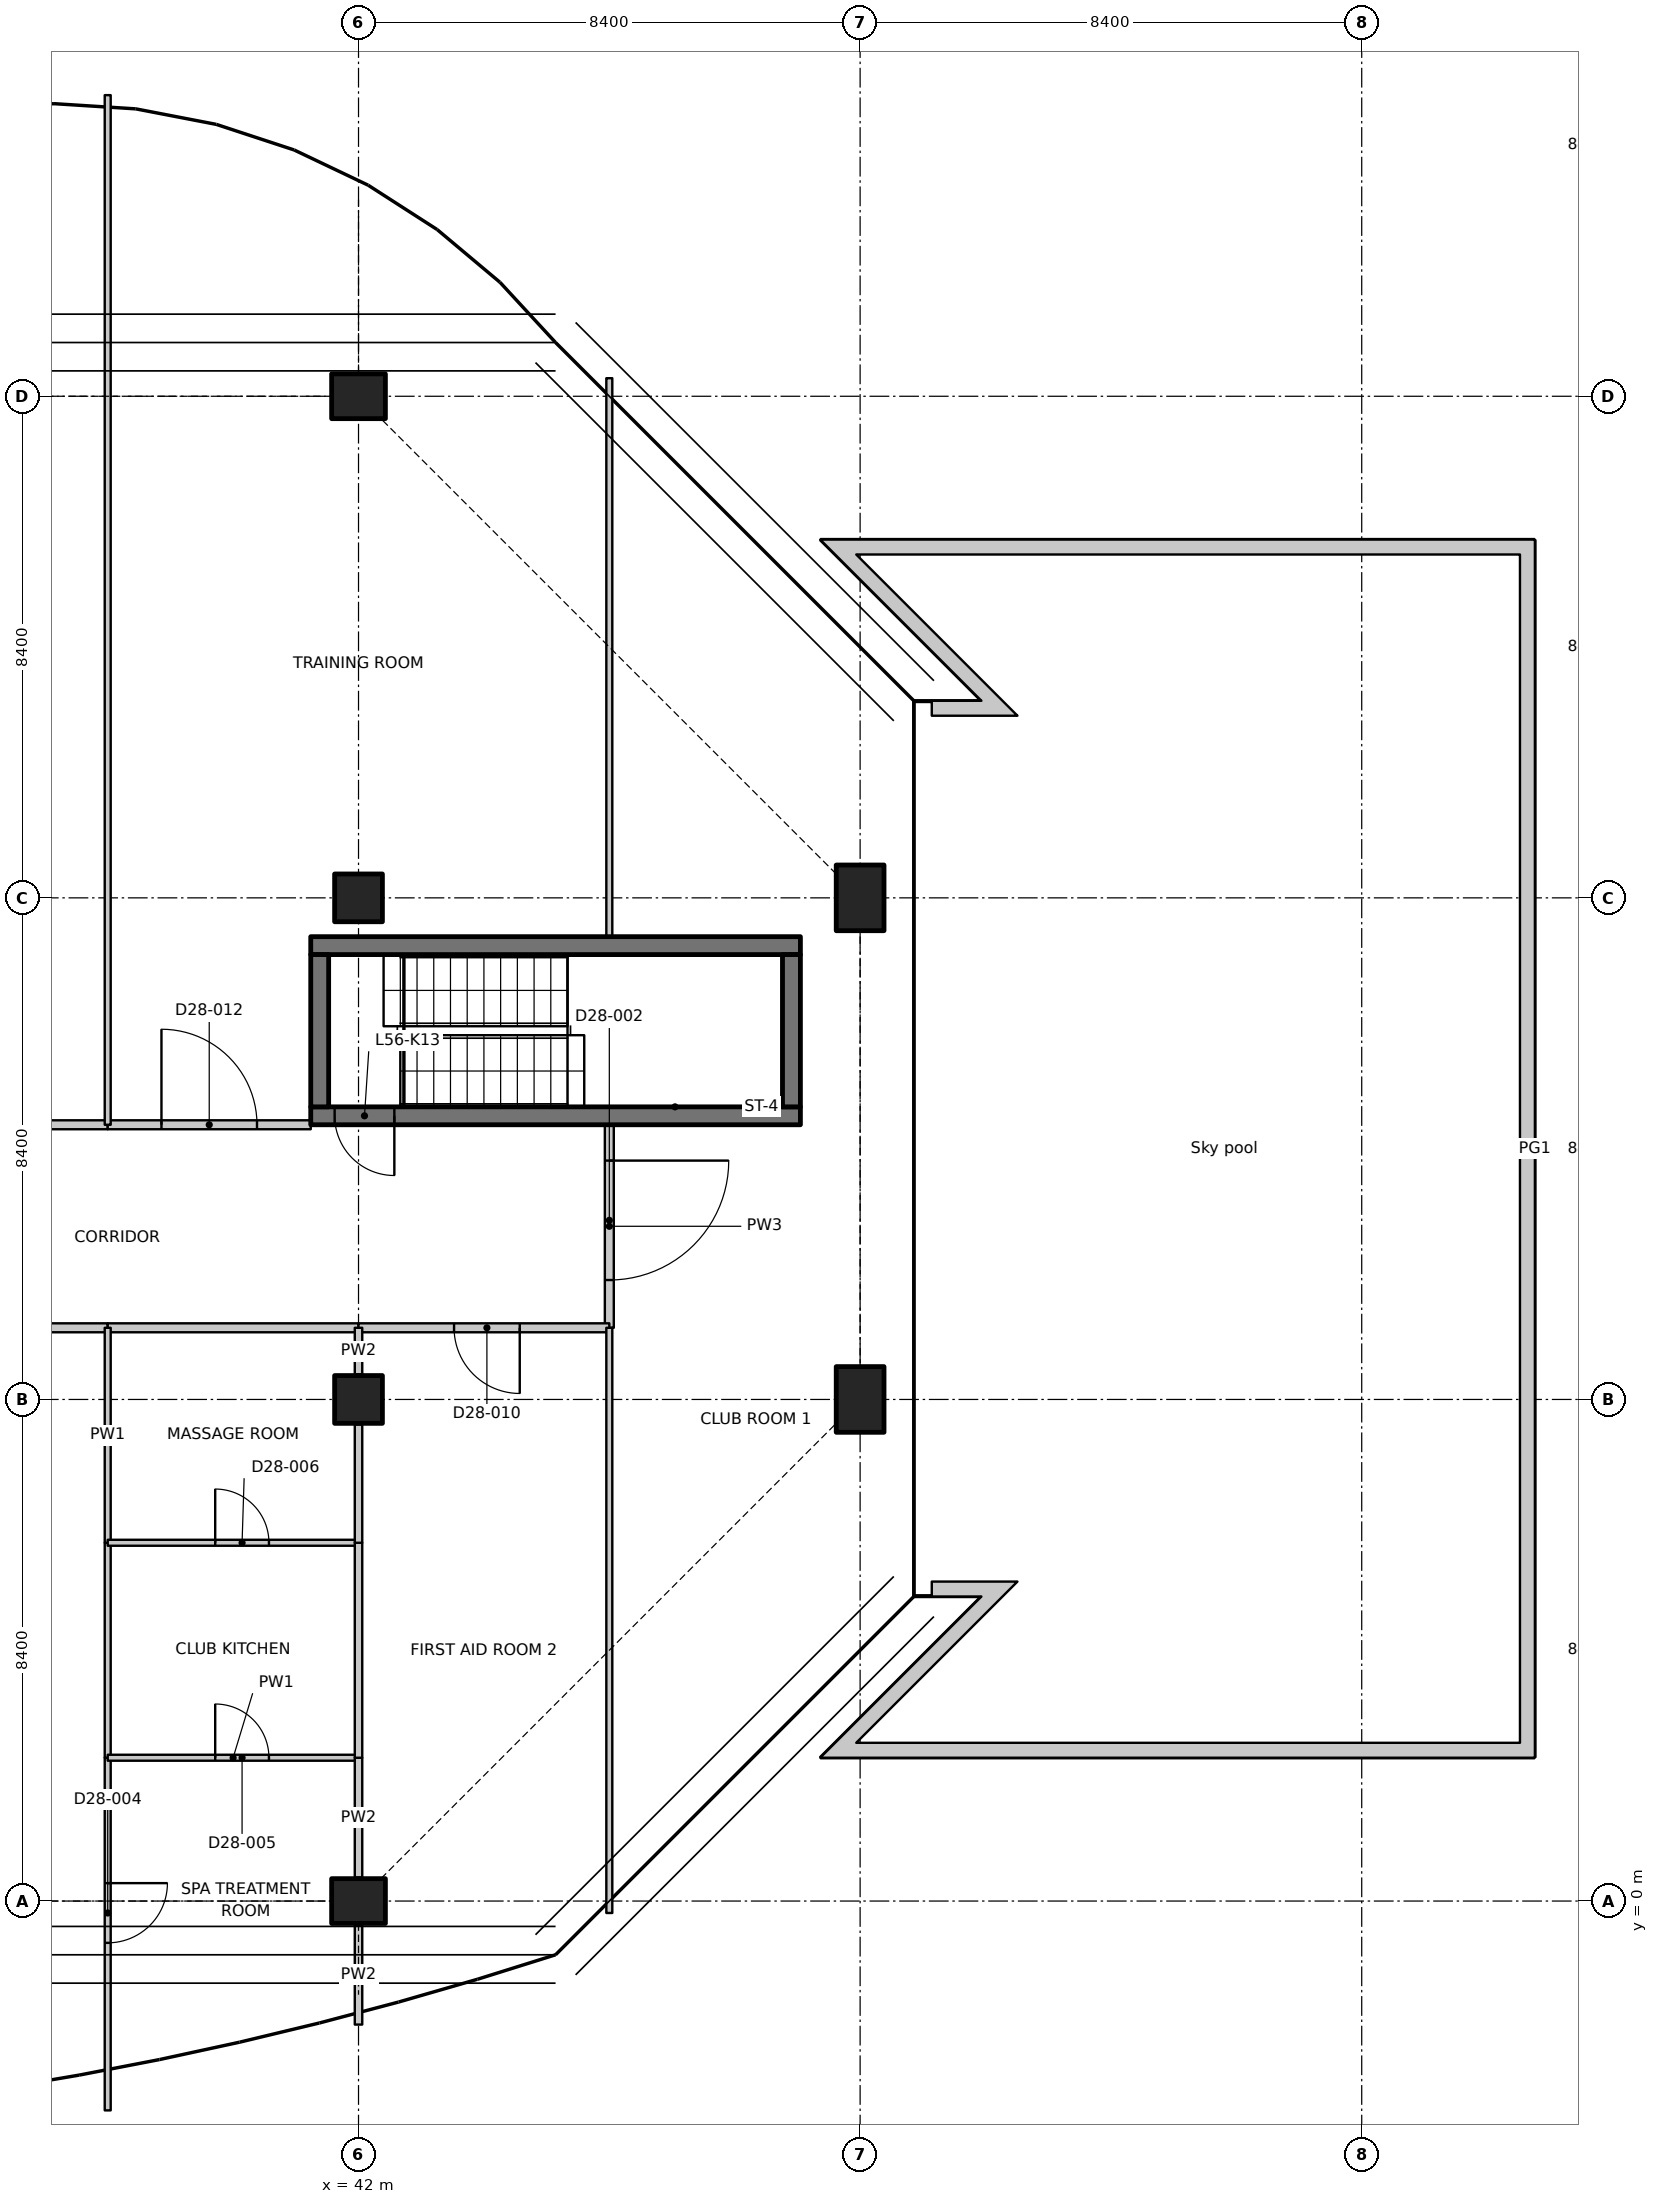
"""IFC4 building model, lengths in metres.
Left out: names, types, materials, properties, quantities, classifications, styles, units other than length and angle.
Written with IfcOpenShell. Run it as: python <this file> out.ifc"""

import sys

from ifc_helpers import new_model, si_unit, direction, frame, frame_2d, origin, origin_2d, place, context, subcontext, project, spatial, polyline, rectangle, outline, extrude, element, fill, save


model = new_model("IFC4")
c1 = context("Model", 3, precision=1e-05, world=origin(), true_north=direction((0.0, 1.0)))
c2 = subcontext(c1, "Body", "Model", "MODEL_VIEW")
j1 = project(units=[si_unit("LENGTHUNIT", "METRE"), si_unit("PLANEANGLEUNIT", "RADIAN")], contexts=[c1])
p1 = place(None, origin())
s1 = spatial("IfcSite", under=j1, at=p1, CompositionType="ELEMENT")
p2 = place(p1, origin())
s2 = spatial("IfcBuilding", under=s1, at=p2, CompositionType="ELEMENT")
p3 = place(p2, frame((0.0, 0.0, 222.9)))
s3 = spatial("IfcBuildingStorey", under=s2, at=p3, CompositionType="ELEMENT", Elevation=222.9)
p4 = place(p3, frame((42.0, 0.0, 0.0), z_axis=(0.0, 0.0, 1.0), x_axis=(0.0, 1.0, 0.0)))
e1 = element("IfcColumn", 1, at=p4, inside=s3, PredefinedType="COLUMN", context=c2, shape_type="SweptSolid", body=[
    extrude(rectangle(XDim=0.75, YDim=0.9, at=origin_2d()), origin(), (0.0, 0.0, 1.0), 3.35),
])
for number, where, z_axis, x_axis in (
    (2, (42.0, 8.4, 0.0), (0.0, 0.0, 1.0), (1.0, 0.0, 0.0)),
    (3, (42.0, 16.8, 0.0), (0.0, 0.0, 1.0), (1.0, 0.0, 0.0)),
):
    element("IfcColumn", number, at=place(p3, frame(where, z_axis=z_axis, x_axis=x_axis)), inside=s3, PredefinedType="COLUMN", context=c2, shape_type="SweptSolid", body=[
        extrude(rectangle(XDim=0.8, YDim=0.8, at=origin_2d()), origin(), (0.0, 0.0, 1.0), 3.35),
    ])
p5 = place(p3, frame((42.0, 25.2, 0.0), z_axis=(0.0, 0.0, 1.0), x_axis=(0.0, 1.0, 0.0)))
e4 = element("IfcColumn", 4, at=p5, inside=s3, PredefinedType="COLUMN", context=c2, shape_type="SweptSolid", body=[
    extrude(rectangle(XDim=0.75, YDim=0.9, at=origin_2d()), origin(), (0.0, 0.0, 1.0), 3.35),
])
for number, where, z_axis, x_axis in (
    (5, (50.4, 8.4, 0.0), (0.0, 0.0, 1.0), (1.0, 0.0, 0.0)),
    (6, (50.4, 16.8, 0.0), (0.0, 0.0, 1.0), (1.0, 0.0, 0.0)),
):
    element("IfcColumn", number, at=place(p3, frame(where, z_axis=z_axis, x_axis=x_axis)), inside=s3, PredefinedType="COLUMN", context=c2, shape_type="SweptSolid", body=[
        extrude(rectangle(XDim=0.8, YDim=1.1, at=origin_2d()), origin(), (0.0, 0.0, 1.0), 3.35),
    ])
p6 = place(p3, origin())
e7 = element("IfcWall", 7, at=p6, inside=s3, PredefinedType="PARAPET", context=c2, shape_type="SweptSolid", body=[
    extrude(outline(polyline([(52.431, 5.1), (49.731, 2.4), (61.7, 2.4), (61.7, 22.8), (49.731, 22.8), (52.431, 20.1), (51.3, 20.1), (51.3, 20.08), (51.6, 20.08), (51.6, 19.85), (53.035, 19.85), (50.335, 22.55), (61.45, 22.55), (61.45, 2.65), (50.335, 2.65), (53.035, 5.35), (51.6, 5.35), (51.6, 5.12), (51.3, 5.12), (51.3, 5.1), (52.431, 5.1)])), origin(), (0.0, 0.0, 1.0), 3.0),
])
p7 = place(p3, frame((49.4, 13.15, 0.0), z_axis=(0.0, 0.0, 1.0), x_axis=(-1.0, 0.0, 0.0)))
e8 = element("IfcWall", 8, at=p7, inside=s3, PredefinedType="SHEAR", context=c2, shape_type="SweptSolid", body=[
    extrude(rectangle(XDim=8.2, YDim=0.3, at=frame_2d((4.1, 0.0))), origin(), (0.0, 0.0, 1.0), 3.35),
])
p8 = place(p7, frame((6.8, 0.0, 0.0)))
e9 = element("IfcOpeningElement", 9, at=p8, cuts=e8, PredefinedType="OPENING", context=c2, shape_type="SweptSolid", body=[
    extrude(rectangle(XDim=1.0, YDim=2.1, at=frame_2d((0.5, 1.05))), frame((0.0, 0.16, 0.0), z_axis=(0.0, -1.0, 0.0), x_axis=(1.0, 0.0, 0.0)), (0.0, 0.0, 1.0), 0.32),
])
p9 = place(p3, frame((41.2, 16.0, 0.0), z_axis=(0.0, 0.0, 1.0), x_axis=(1.0, 0.0, 0.0)))
e10 = element("IfcWall", 10, at=p9, inside=s3, PredefinedType="SHEAR", context=c2, shape_type="SweptSolid", body=[
    extrude(rectangle(XDim=8.2, YDim=0.3, at=frame_2d((4.1, 0.0))), origin(), (0.0, 0.0, 1.0), 3.35),
])
for number, where, z_axis, x_axis in (
    (11, (41.35, 13.3, 0.0), (0.0, 0.0, 1.0), (0.0, 1.0, 0.0)),
    (12, (49.25, 13.3, 0.0), (0.0, 0.0, 1.0), (0.0, 1.0, 0.0)),
):
    element("IfcWall", number, at=place(p3, frame(where, z_axis=z_axis, x_axis=x_axis)), inside=s3, PredefinedType="SHEAR", context=c2, shape_type="SweptSolid", body=[
        extrude(rectangle(XDim=2.55, YDim=0.3, at=frame_2d((1.275, 0.0))), origin(), (0.0, 0.0, 1.0), 3.35),
    ])
p10 = place(p3, frame((46.2, 13.0, 0.0), z_axis=(0.0, 0.0, 1.0), x_axis=(0.0, -1.0, 0.0)))
e13 = element("IfcWall", 13, at=p10, inside=s3, PredefinedType="PARTITIONING", context=c2, shape_type="SweptSolid", body=[
    extrude(rectangle(XDim=3.4, YDim=0.15, at=frame_2d((1.7, 0.0))), origin(), (0.0, 0.0, 1.0), 3.33),
])
p11 = place(p10, frame((0.6, 0.0, 0.0)))
e14 = element("IfcOpeningElement", 14, at=p11, cuts=e13, PredefinedType="OPENING", context=c2, shape_type="SweptSolid", body=[
    extrude(rectangle(XDim=2.0, YDim=2.4, at=frame_2d((1.0, 1.2))), frame((0.0, 0.085, 0.0), z_axis=(0.0, -1.0, 0.0), x_axis=(1.0, 0.0, 0.0)), (0.0, 0.0, 1.0), 0.17),
])
p12 = place(p3, frame((37.8, 9.6, 0.0), z_axis=(0.0, 0.0, 1.0), x_axis=(-1.0, 0.0, 0.0)))
e15 = element("IfcWall", 15, at=p12, inside=s3, PredefinedType="PARTITIONING", context=c2, shape_type="SweptSolid", body=[
    extrude(rectangle(XDim=8.4, YDim=0.15, at=frame_2d((4.2, 0.0))), origin(), (0.0, 0.0, 1.0), 3.33),
])
p13 = place(p12, frame((4.8, 0.0, 0.0)))
e16 = element("IfcOpeningElement", 16, at=p13, cuts=e15, PredefinedType="OPENING", context=c2, shape_type="SweptSolid", body=[
    extrude(rectangle(XDim=2.0, YDim=2.4, at=frame_2d((1.0, 1.2))), frame((0.0, 0.085, 0.0), z_axis=(0.0, -1.0, 0.0), x_axis=(1.0, 0.0, 0.0)), (0.0, 0.0, 1.0), 0.17),
])
p14 = place(p3, frame((42.0, 9.6, 0.0), z_axis=(0.0, 0.0, 1.0), x_axis=(-1.0, 0.0, 0.0)))
e17 = element("IfcWall", 17, at=p14, inside=s3, PredefinedType="PARTITIONING", context=c2, shape_type="SweptSolid", body=[
    extrude(rectangle(XDim=4.2, YDim=0.15, at=frame_2d((2.1, 0.0))), origin(), (0.0, 0.0, 1.0), 3.33),
])
p15 = place(p3, frame((46.2, 9.6, 0.0), z_axis=(0.0, 0.0, 1.0), x_axis=(-1.0, 0.0, 0.0)))
e18 = element("IfcWall", 18, at=p15, inside=s3, PredefinedType="PARTITIONING", context=c2, shape_type="SweptSolid", body=[
    extrude(rectangle(XDim=4.2, YDim=0.15, at=frame_2d((2.1, 0.0))), origin(), (0.0, 0.0, 1.0), 3.33),
])
p16 = place(p15, frame((1.5, 0.0, 0.0)))
e19 = element("IfcOpeningElement", 19, at=p16, cuts=e18, PredefinedType="OPENING", context=c2, shape_type="SweptSolid", body=[
    extrude(rectangle(XDim=1.1, YDim=2.1, at=frame_2d((0.55, 1.05))), frame((0.0, 0.085, 0.0), z_axis=(0.0, -1.0, 0.0), x_axis=(1.0, 0.0, 0.0)), (0.0, 0.0, 1.0), 0.17),
])
p17 = place(p3, frame((29.4, 13.0, 0.0), z_axis=(0.0, 0.0, 1.0), x_axis=(1.0, 0.0, 0.0)))
e20 = element("IfcWall", 20, at=p17, inside=s3, PredefinedType="PARTITIONING", context=c2, shape_type="SweptSolid", body=[
    extrude(rectangle(XDim=8.4, YDim=0.15, at=frame_2d((4.2, 0.0))), origin(), (0.0, 0.0, 1.0), 3.33),
])
p18 = place(p17, frame((3.3, 0.0, 0.0)))
e21 = element("IfcOpeningElement", 21, at=p18, cuts=e20, PredefinedType="OPENING", context=c2, shape_type="SweptSolid", body=[
    extrude(rectangle(XDim=1.8, YDim=2.1, at=frame_2d((0.9, 1.05))), frame((0.0, 0.085, 0.0), z_axis=(0.0, -1.0, 0.0), x_axis=(1.0, 0.0, 0.0)), (0.0, 0.0, 1.0), 0.17),
])
p19 = place(p3, frame((37.8, 13.0, 0.0), z_axis=(0.0, 0.0, 1.0), x_axis=(1.0, 0.0, 0.0)))
e22 = element("IfcWall", 22, at=p19, inside=s3, PredefinedType="PARTITIONING", context=c2, shape_type="SweptSolid", body=[
    extrude(rectangle(XDim=3.4, YDim=0.15, at=frame_2d((1.7, 0.0))), origin(), (0.0, 0.0, 1.0), 3.33),
])
p20 = place(p19, frame((0.9, 0.0, 0.0)))
e23 = element("IfcOpeningElement", 23, at=p20, cuts=e22, PredefinedType="OPENING", context=c2, shape_type="SweptSolid", body=[
    extrude(rectangle(XDim=1.6, YDim=2.1, at=frame_2d((0.8, 1.05))), frame((0.0, 0.085, 0.0), z_axis=(0.0, -1.0, 0.0), x_axis=(1.0, 0.0, 0.0)), (0.0, 0.0, 1.0), 0.17),
])
p21 = place(p3, frame((46.2, -0.2, 0.0), z_axis=(0.0, 0.0, 1.0), x_axis=(0.0, 1.0, 0.0)))
e24 = element("IfcWall", 24, at=p21, inside=s3, PredefinedType="PARTITIONING", context=c2, shape_type="SweptSolid", body=[
    extrude(outline(polyline([(0.0, 0.0), (9.8, 0.0), (9.8, 3.33), (5.066, 3.33), (5.064, 2.98), (3.736, 2.98), (3.734, 3.33), (0.0, 3.33), (0.0, 0.0)])), frame((0.0, 0.05, 0.0), z_axis=(0.0, -1.0, 0.0), x_axis=(1.0, 0.0, 0.0)), (0.0, 0.0, 1.0), 0.1),
])
p22 = place(p3, frame((46.2, 16.15, 0.0), z_axis=(0.0, 0.0, 1.0), x_axis=(0.0, 1.0, 0.0)))
e25 = element("IfcWall", 25, at=p22, inside=s3, PredefinedType="PARTITIONING", context=c2, shape_type="SweptSolid", body=[
    extrude(outline(polyline([(0.0, 0.0), (9.353, 0.0), (9.353, 3.33), (9.25, 3.33), (5.516, 3.33), (5.514, 2.98), (4.186, 2.98), (4.184, 3.33), (0.0, 3.33), (0.0, 0.0)])), frame((0.0, 0.05, 0.0), z_axis=(0.0, -1.0, 0.0), x_axis=(1.0, 0.0, 0.0)), (0.0, 0.0, 1.0), 0.1),
])
p23 = place(p3, frame((37.8, 2.4, 0.0), z_axis=(0.0, 0.0, 1.0), x_axis=(0.0, -1.0, 0.0)))
e26 = element("IfcWall", 26, at=p23, inside=s3, PredefinedType="PARTITIONING", context=c2, shape_type="SweptSolid", body=[
    extrude(outline(polyline([(0.0, 0.0), (5.906, 0.0), (5.906, 3.33), (5.422, 3.33), (2.85, 3.33), (2.848, 2.98), (1.952, 2.98), (1.95, 3.33), (0.0, 3.33), (0.0, 0.0)])), frame((0.0, 0.05, 0.0), z_axis=(0.0, -1.0, 0.0), x_axis=(1.0, 0.0, 0.0)), (0.0, 0.0, 1.0), 0.1),
])
p24 = place(p23, frame((2.1, 0.0, 0.0)))
e27 = element("IfcOpeningElement", 27, at=p24, cuts=e26, PredefinedType="OPENING", context=c2, shape_type="SweptSolid", body=[
    extrude(rectangle(XDim=1.0, YDim=2.1, at=frame_2d((0.5, 1.05))), frame((0.0, 0.06, 0.0), z_axis=(0.0, -1.0, 0.0), x_axis=(1.0, 0.0, 0.0)), (0.0, 0.0, 1.0), 0.12),
])
for number, where, z_axis, x_axis in (
    (28, (37.8, 6.0, 0.0), (0.0, 0.0, 1.0), (0.0, -1.0, 0.0)),
    (29, (37.8, 9.6, 0.0), (0.0, 0.0, 1.0), (0.0, -1.0, 0.0)),
):
    element("IfcWall", number, at=place(p3, frame(where, z_axis=z_axis, x_axis=x_axis)), inside=s3, PredefinedType="PARTITIONING", context=c2, shape_type="SweptSolid", body=[
        extrude(rectangle(XDim=3.6, YDim=0.1, at=frame_2d((1.8, 0.0))), origin(), (0.0, 0.0, 1.0), 3.33),
    ])
p25 = place(p3, frame((37.8, 2.4, 0.0), z_axis=(0.0, 0.0, 1.0), x_axis=(1.0, 0.0, 0.0)))
e30 = element("IfcWall", 30, at=p25, inside=s3, PredefinedType="PARTITIONING", context=c2, shape_type="SweptSolid", body=[
    extrude(rectangle(XDim=4.2, YDim=0.1, at=frame_2d((2.1, 0.0))), origin(), (0.0, 0.0, 1.0), 3.33),
])
p26 = place(p25, frame((1.8, 0.0, 0.0)))
e31 = element("IfcOpeningElement", 31, at=p26, cuts=e30, PredefinedType="OPENING", context=c2, shape_type="SweptSolid", body=[
    extrude(rectangle(XDim=0.9, YDim=2.1, at=frame_2d((0.45, 1.05))), frame((0.0, 0.06, 0.0), z_axis=(0.0, -1.0, 0.0), x_axis=(1.0, 0.0, 0.0)), (0.0, 0.0, 1.0), 0.12),
])
p27 = place(p3, frame((42.0, 2.4, 0.0), z_axis=(0.0, 0.0, 1.0), x_axis=(0.0, -1.0, 0.0)))
e32 = element("IfcWall", 32, at=p27, inside=s3, PredefinedType="PARTITIONING", context=c2, shape_type="SweptSolid", body=[
    extrude(rectangle(XDim=2.005, YDim=0.125, at=frame_2d((1.002, 0.0))), origin(), (0.0, 0.0, 1.0), 2.98),
])
p28 = place(p3, frame((42.0, -0.395, 0.0), z_axis=(0.0, 0.0, 1.0), x_axis=(0.0, -1.0, 0.0)))
e33 = element("IfcWall", 33, at=p28, inside=s3, PredefinedType="PARTITIONING", context=c2, shape_type="SweptSolid", body=[
    extrude(rectangle(XDim=1.674, YDim=0.125, at=frame_2d((0.837, 0.0))), origin(), (0.0, 0.0, 1.0), 2.98),
])
p29 = place(p3, frame((37.8, 6.0, 0.0), z_axis=(0.0, 0.0, 1.0), x_axis=(1.0, 0.0, 0.0)))
e34 = element("IfcWall", 34, at=p29, inside=s3, PredefinedType="PARTITIONING", context=c2, shape_type="SweptSolid", body=[
    extrude(rectangle(XDim=4.2, YDim=0.1, at=frame_2d((2.1, 0.0))), origin(), (0.0, 0.0, 1.0), 3.33),
])
p30 = place(p29, frame((1.8, 0.0, 0.0)))
e35 = element("IfcOpeningElement", 35, at=p30, cuts=e34, PredefinedType="OPENING", context=c2, shape_type="SweptSolid", body=[
    extrude(rectangle(XDim=0.9, YDim=2.1, at=frame_2d((0.45, 1.05))), frame((0.0, 0.06, 0.0), z_axis=(0.0, -1.0, 0.0), x_axis=(1.0, 0.0, 0.0)), (0.0, 0.0, 1.0), 0.12),
])
p31 = place(p3, frame((42.0, 6.0, 0.0), z_axis=(0.0, 0.0, 1.0), x_axis=(0.0, -1.0, 0.0)))
e36 = element("IfcWall", 36, at=p31, inside=s3, PredefinedType="PARTITIONING", context=c2, shape_type="SweptSolid", body=[
    extrude(rectangle(XDim=3.6, YDim=0.125, at=frame_2d((1.8, 0.0))), origin(), (0.0, 0.0, 1.0), 3.33),
])
p32 = place(p3, frame((42.0, 9.6, 0.0), z_axis=(0.0, 0.0, 1.0), x_axis=(0.0, -1.0, 0.0)))
e37 = element("IfcWall", 37, at=p32, inside=s3, PredefinedType="PARTITIONING", context=c2, shape_type="SweptSolid", body=[
    extrude(rectangle(XDim=0.78, YDim=0.125, at=frame_2d((0.39, 0.0))), origin(), (0.0, 0.0, 1.0), 3.33),
])
p33 = place(p3, frame((42.0, 7.98, 0.0), z_axis=(0.0, 0.0, 1.0), x_axis=(0.0, -1.0, 0.0)))
e38 = element("IfcWall", 38, at=p33, inside=s3, PredefinedType="PARTITIONING", context=c2, shape_type="SweptSolid", body=[
    extrude(rectangle(XDim=1.98, YDim=0.125, at=frame_2d((0.99, 0.0))), origin(), (0.0, 0.0, 1.0), 3.33),
])
p34 = place(p3, frame((37.8, 30.243, 0.0), z_axis=(0.0, 0.0, 1.0), x_axis=(0.0, -1.0, 0.0)))
e39 = element("IfcWall", 39, at=p34, inside=s3, PredefinedType="PARTITIONING", context=c2, shape_type="SweptSolid", body=[
    extrude(outline(polyline([(0.0, 0.0), (17.243, 0.0), (17.243, 3.33), (5.493, 3.33), (5.491, 2.98), (4.595, 2.98), (4.593, 3.33), (0.0, 3.33), (0.0, 0.0)])), frame((0.0, 0.05, 0.0), z_axis=(0.0, -1.0, 0.0), x_axis=(1.0, 0.0, 0.0)), (0.0, 0.0, 1.0), 0.1),
])
p35 = place(p8, origin())
e40 = element("IfcDoor", 40, at=p35, inside=s3, OperationType="SINGLE_SWING_RIGHT", PredefinedType="DOOR", context=c2, shape_type="SweptSolid", body=[
    extrude(rectangle(XDim=1.0, YDim=2.1, at=frame_2d((0.5, 1.05))), frame((0.0, 0.025, 0.0), z_axis=(0.0, -1.0, 0.0), x_axis=(1.0, 0.0, 0.0)), (0.0, 0.0, 1.0), 0.05),
])
fill(e9, e40)
p36 = place(p11, origin())
e41 = element("IfcDoor", 41, at=p36, inside=s3, OperationType="DOUBLE_DOOR_SINGLE_SWING", PredefinedType="DOOR", context=c2, shape_type="SweptSolid", body=[
    extrude(rectangle(XDim=2.0, YDim=2.4, at=frame_2d((1.0, 1.2))), frame((0.0, 0.025, 0.0), z_axis=(0.0, -1.0, 0.0), x_axis=(1.0, 0.0, 0.0)), (0.0, 0.0, 1.0), 0.05),
])
fill(e14, e41)
p37 = place(p24, origin())
e42 = element("IfcDoor", 42, at=p37, inside=s3, OperationType="SINGLE_SWING_LEFT", PredefinedType="DOOR", context=c2, shape_type="SweptSolid", body=[
    extrude(rectangle(XDim=1.0, YDim=2.1, at=frame_2d((0.5, 1.05))), frame((0.0, 0.025, 0.0), z_axis=(0.0, -1.0, 0.0), x_axis=(1.0, 0.0, 0.0)), (0.0, 0.0, 1.0), 0.05),
])
fill(e27, e42)
p38 = place(p26, origin())
e43 = element("IfcDoor", 43, at=p38, inside=s3, OperationType="SINGLE_SWING_LEFT", PredefinedType="DOOR", context=c2, shape_type="SweptSolid", body=[
    extrude(rectangle(XDim=0.9, YDim=2.1, at=frame_2d((0.45, 1.05))), frame((0.0, 0.025, 0.0), z_axis=(0.0, -1.0, 0.0), x_axis=(1.0, 0.0, 0.0)), (0.0, 0.0, 1.0), 0.05),
])
fill(e31, e43)
p39 = place(p30, origin())
e44 = element("IfcDoor", 44, at=p39, inside=s3, OperationType="SINGLE_SWING_LEFT", PredefinedType="DOOR", context=c2, shape_type="SweptSolid", body=[
    extrude(rectangle(XDim=0.9, YDim=2.1, at=frame_2d((0.45, 1.05))), frame((0.0, 0.025, 0.0), z_axis=(0.0, -1.0, 0.0), x_axis=(1.0, 0.0, 0.0)), (0.0, 0.0, 1.0), 0.05),
])
fill(e35, e44)
p40 = place(p16, origin())
e45 = element("IfcDoor", 45, at=p40, inside=s3, OperationType="SINGLE_SWING_LEFT", PredefinedType="DOOR", context=c2, shape_type="SweptSolid", body=[
    extrude(rectangle(XDim=1.1, YDim=2.1, at=frame_2d((0.55, 1.05))), frame((0.0, 0.025, 0.0), z_axis=(0.0, -1.0, 0.0), x_axis=(1.0, 0.0, 0.0)), (0.0, 0.0, 1.0), 0.05),
])
fill(e19, e45)
p41 = place(p20, origin())
e46 = element("IfcDoor", 46, at=p41, inside=s3, OperationType="DOUBLE_DOOR_SINGLE_SWING", PredefinedType="DOOR", context=c2, shape_type="SweptSolid", body=[
    extrude(rectangle(XDim=1.6, YDim=2.1, at=frame_2d((0.8, 1.05))), frame((0.0, 0.025, 0.0), z_axis=(0.0, -1.0, 0.0), x_axis=(1.0, 0.0, 0.0)), (0.0, 0.0, 1.0), 0.05),
])
fill(e23, e46)
save(model, sys.argv[1])
